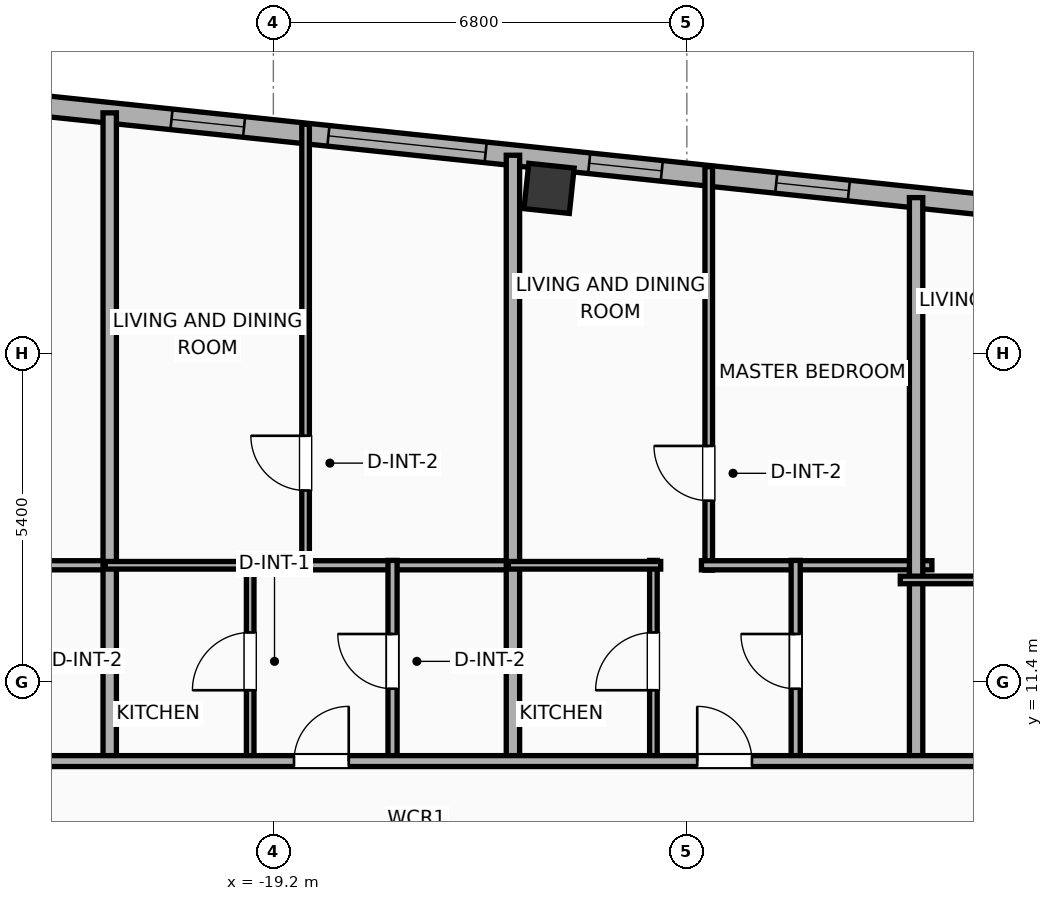
"""IFC4 building model, lengths in metres.
Left out: names, types, materials, properties, quantities, classifications, styles, units other than length and angle.
Written with IfcOpenShell. Run it as: python <this file> out.ifc"""

import sys

from ifc_helpers import new_model, si_unit, direction, frame, frame_2d, origin, origin_2d, place, context, subcontext, project, spatial, rectangle, hollow_rectangle, extrude, element, fill, save


model = new_model("IFC4")
c1 = context("Model", 3, precision=1e-05, world=origin(), true_north=direction((0.0, 1.0)))
c2 = subcontext(c1, "Body", "Model", "MODEL_VIEW")
j1 = project(units=[si_unit("LENGTHUNIT", "METRE"), si_unit("PLANEANGLEUNIT", "RADIAN")], contexts=[c1])
p1 = place(None, origin())
s1 = spatial("IfcSite", under=j1, at=p1, CompositionType="ELEMENT")
p2 = place(p1, origin())
s2 = spatial("IfcBuilding", under=s1, at=p2, CompositionType="ELEMENT")
p3 = place(p2, frame((0.0, 0.0, 299.0)))
s3 = spatial("IfcBuildingStorey", under=s2, at=p3, CompositionType="ELEMENT", Elevation=299.0)
p4 = place(p3, frame((-14.666, 19.518, 0.0), z_axis=(0.0, 0.0, 1.0), x_axis=(0.994521895368, -0.104528463268, 0.0)))
e1 = element("IfcColumn", 1, at=p4, inside=s3, PredefinedType="COLUMN", context=c2, shape_type="SweptSolid", body=[
    extrude(hollow_rectangle(XDim=0.75, YDim=0.75, WallThickness=0.025, at=origin_2d()), origin(), (0.0, 0.0, 1.0), 3.9),
])
p5 = place(p3, frame((-23.908, 20.972, 0.0), z_axis=(0.0, 0.0, 1.0), x_axis=(0.994521888554, -0.104528528102, 0.0)))
e2 = element("IfcWall", 2, at=p5, inside=s3, PredefinedType="ELEMENTEDWALL", context=c2, shape_type="SweptSolid", body=[
    extrude(rectangle(XDim=46.766, YDim=0.34, at=frame_2d((23.383, 0.0))), origin(), (0.0, 0.0, 1.0), 3.635),
])
p6 = place(p5, frame((5.644, 0.0, 0.65)))
e3 = element("IfcOpeningElement", 3, at=p6, cuts=e2, PredefinedType="OPENING", context=c2, shape_type="SweptSolid", body=[
    extrude(rectangle(XDim=2.6, YDim=2.45, at=frame_2d((1.3, 1.225))), frame((0.0, 0.18, 0.0), z_axis=(0.0, -1.0, 0.0), x_axis=(1.0, 0.0, 0.0)), (0.0, 0.0, 1.0), 0.36),
])
p7 = place(p5, frame((3.05, 0.0, 0.75)))
e4 = element("IfcOpeningElement", 4, at=p7, cuts=e2, PredefinedType="OPENING", context=c2, shape_type="SweptSolid", body=[
    extrude(rectangle(XDim=1.2, YDim=2.05, at=frame_2d((0.6, 1.025))), frame((0.0, 0.18, 0.0), z_axis=(0.0, -1.0, 0.0), x_axis=(1.0, 0.0, 0.0)), (0.0, 0.0, 1.0), 0.36),
])
p8 = place(p5, frame((9.957, 0.0, 0.75)))
e5 = element("IfcOpeningElement", 5, at=p8, cuts=e2, PredefinedType="OPENING", context=c2, shape_type="SweptSolid", body=[
    extrude(rectangle(XDim=1.2, YDim=2.05, at=frame_2d((0.6, 1.025))), frame((0.0, 0.18, 0.0), z_axis=(0.0, -1.0, 0.0), x_axis=(1.0, 0.0, 0.0)), (0.0, 0.0, 1.0), 0.36),
])
p9 = place(p5, frame((13.05, 0.0, 0.75)))
e6 = element("IfcOpeningElement", 6, at=p9, cuts=e2, PredefinedType="OPENING", context=c2, shape_type="SweptSolid", body=[
    extrude(rectangle(XDim=1.2, YDim=2.05, at=frame_2d((0.6, 1.025))), frame((0.0, 0.18, 0.0), z_axis=(0.0, -1.0, 0.0), x_axis=(1.0, 0.0, 0.0)), (0.0, 0.0, 1.0), 0.36),
])
p10 = place(p5, frame((16.383, 0.0, 0.75)))
e7 = element("IfcOpeningElement", 7, at=p10, cuts=e2, PredefinedType="OPENING", context=c2, shape_type="SweptSolid", body=[
    extrude(rectangle(XDim=1.2, YDim=2.05, at=frame_2d((0.6, 1.025))), frame((0.0, 0.18, 0.0), z_axis=(0.0, -1.0, 0.0), x_axis=(1.0, 0.0, 0.0)), (0.0, 0.0, 1.0), 0.36),
])
p11 = place(p5, frame((19.716, 0.0, 0.75)))
e8 = element("IfcOpeningElement", 8, at=p11, cuts=e2, PredefinedType="OPENING", context=c2, shape_type="SweptSolid", body=[
    extrude(rectangle(XDim=1.2, YDim=2.05, at=frame_2d((0.6, 1.025))), frame((0.0, 0.18, 0.0), z_axis=(0.0, -1.0, 0.0), x_axis=(1.0, 0.0, 0.0)), (0.0, 0.0, 1.0), 0.36),
])
p12 = place(p5, frame((23.195, 0.0, 0.75)))
e9 = element("IfcOpeningElement", 9, at=p12, cuts=e2, PredefinedType="OPENING", context=c2, shape_type="SweptSolid", body=[
    extrude(rectangle(XDim=1.2, YDim=2.05, at=frame_2d((0.6, 1.025))), frame((0.0, 0.18, 0.0), z_axis=(0.0, -1.0, 0.0), x_axis=(1.0, 0.0, 0.0)), (0.0, 0.0, 1.0), 0.36),
])
p13 = place(p5, frame((26.194, 0.0, 0.75)))
e10 = element("IfcOpeningElement", 10, at=p13, cuts=e2, PredefinedType="OPENING", context=c2, shape_type="SweptSolid", body=[
    extrude(rectangle(XDim=1.2, YDim=2.05, at=frame_2d((0.6, 1.025))), frame((0.0, 0.18, 0.0), z_axis=(0.0, -1.0, 0.0), x_axis=(1.0, 0.0, 0.0)), (0.0, 0.0, 1.0), 0.36),
])
p14 = place(p5, frame((30.152, 0.0, 0.75)))
e11 = element("IfcOpeningElement", 11, at=p14, cuts=e2, PredefinedType="OPENING", context=c2, shape_type="SweptSolid", body=[
    extrude(rectangle(XDim=1.2, YDim=2.05, at=frame_2d((0.6, 1.025))), frame((0.0, 0.18, 0.0), z_axis=(0.0, -1.0, 0.0), x_axis=(1.0, 0.0, 0.0)), (0.0, 0.0, 1.0), 0.36),
])
p15 = place(p5, frame((33.631, 0.0, 0.75)))
e12 = element("IfcOpeningElement", 12, at=p15, cuts=e2, PredefinedType="OPENING", context=c2, shape_type="SweptSolid", body=[
    extrude(rectangle(XDim=1.2, YDim=2.05, at=frame_2d((0.6, 1.025))), frame((0.0, 0.18, 0.0), z_axis=(0.0, -1.0, 0.0), x_axis=(1.0, 0.0, 0.0)), (0.0, 0.0, 1.0), 0.36),
])
p16 = place(p5, frame((38.07, 0.0, 0.75)))
e13 = element("IfcOpeningElement", 13, at=p16, cuts=e2, PredefinedType="OPENING", context=c2, shape_type="SweptSolid", body=[
    extrude(rectangle(XDim=1.2, YDim=2.05, at=frame_2d((0.6, 1.025))), frame((0.0, 0.18, 0.0), z_axis=(0.0, -1.0, 0.0), x_axis=(1.0, 0.0, 0.0)), (0.0, 0.0, 1.0), 0.36),
])
p17 = place(p5, frame((40.589, 0.0, 0.75)))
e14 = element("IfcOpeningElement", 14, at=p17, cuts=e2, PredefinedType="OPENING", context=c2, shape_type="SweptSolid", body=[
    extrude(rectangle(XDim=1.2, YDim=2.05, at=frame_2d((0.6, 1.025))), frame((0.0, 0.18, 0.0), z_axis=(0.0, -1.0, 0.0), x_axis=(1.0, 0.0, 0.0)), (0.0, 0.0, 1.0), 0.36),
])
p18 = place(p5, frame((43.789, 0.0, 0.75)))
e15 = element("IfcOpeningElement", 15, at=p18, cuts=e2, PredefinedType="OPENING", context=c2, shape_type="SweptSolid", body=[
    extrude(rectangle(XDim=1.2, YDim=2.05, at=frame_2d((0.6, 1.025))), frame((0.0, 0.18, 0.0), z_axis=(0.0, -1.0, 0.0), x_axis=(1.0, 0.0, 0.0)), (0.0, 0.0, 1.0), 0.36),
])
p19 = place(p3, frame((-25.421, 13.32, 0.0), z_axis=(0.0, 0.0, 1.0), x_axis=(1.0, 0.0, 0.0)))
e16 = element("IfcWall", 16, at=p19, inside=s3, PredefinedType="PLUMBINGWALL", context=c2, shape_type="SweptSolid", body=[
    extrude(rectangle(XDim=3.605, YDim=0.15, at=frame_2d((1.802, 0.0))), origin(), (0.0, 0.0, 1.0), 3.635),
])
p20 = place(p3, frame((-21.891, 10.02, 0.0), z_axis=(0.0, 0.0, 1.0), x_axis=(0.0, 1.0, 0.0)))
e17 = element("IfcWall", 17, at=p20, inside=s3, PredefinedType="PARTITIONING", context=c2, shape_type="SweptSolid", body=[
    extrude(rectangle(XDim=10.74, YDim=0.22, at=frame_2d((5.37, 0.0))), origin(), (0.0, 0.0, 1.0), 3.075),
])
p21 = place(p3, frame((-18.67, 13.24, 0.0), z_axis=(0.0, 0.0, 1.0), x_axis=(0.0, 1.0, 0.0)))
e18 = element("IfcWall", 18, at=p21, inside=s3, PredefinedType="PARTITIONING", context=c2, shape_type="SweptSolid", body=[
    extrude(rectangle(XDim=7.333, YDim=0.125, at=frame_2d((3.666, 0.0))), origin(), (0.0, 0.0, 1.0), 3.635),
])
p22 = place(p21, frame((1.31, 0.0, 0.0)))
e19 = element("IfcOpeningElement", 19, at=p22, cuts=e18, PredefinedType="OPENING", context=c2, shape_type="SweptSolid", body=[
    extrude(rectangle(XDim=0.9, YDim=2.05, at=frame_2d((0.45, 1.025))), frame((0.0, 0.073, 0.0), z_axis=(0.0, -1.0, 0.0), x_axis=(1.0, 0.0, 0.0)), (0.0, 0.0, 1.0), 0.145),
])
p23 = place(p3, frame((-18.79, 13.32, 0.0), z_axis=(0.0, 0.0, 1.0), x_axis=(1.0, 0.0, 0.0)))
e20 = element("IfcWall", 20, at=p23, inside=s3, PredefinedType="PLUMBINGWALL", context=c2, shape_type="SweptSolid", body=[
    extrude(rectangle(XDim=3.605, YDim=0.15, at=frame_2d((1.802, 0.0))), origin(), (0.0, 0.0, 1.0), 3.635),
])
p24 = place(p3, frame((-19.581, 10.08, 0.0), z_axis=(0.0, 0.0, 1.0), x_axis=(0.0, 1.0, 0.0)))
e21 = element("IfcWall", 21, at=p24, inside=s3, PredefinedType="PARTITIONING", context=c2, shape_type="SweptSolid", body=[
    extrude(rectangle(XDim=3.32, YDim=0.125, at=frame_2d((1.66, 0.0))), origin(), (0.0, 0.0, 1.0), 3.635),
])
p25 = place(p24, frame((1.185, 0.0, 0.0)))
e22 = element("IfcOpeningElement", 22, at=p25, cuts=e21, PredefinedType="OPENING", context=c2, shape_type="SweptSolid", body=[
    extrude(rectangle(XDim=0.95, YDim=2.05, at=frame_2d((0.475, 1.025))), frame((0.0, 0.073, 0.0), z_axis=(0.0, -1.0, 0.0), x_axis=(1.0, 0.0, 0.0)), (0.0, 0.0, 1.0), 0.145),
])
p26 = place(p3, frame((-21.966, 13.32, 0.0), z_axis=(0.0, 0.0, 1.0), x_axis=(1.0, 0.0, 0.0)))
e23 = element("IfcWall", 23, at=p26, inside=s3, PredefinedType="PARTITIONING", context=c2, shape_type="SweptSolid", body=[
    extrude(rectangle(XDim=2.505, YDim=0.125, at=frame_2d((1.252, 0.0))), origin(), (0.0, 0.0, 1.0), 3.635),
])
p27 = place(p3, frame((-17.24, 10.08, 0.0), z_axis=(0.0, 0.0, 1.0), x_axis=(0.0, 1.0, 0.0)))
e24 = element("IfcWall", 24, at=p27, inside=s3, PredefinedType="PLUMBINGWALL", context=c2, shape_type="SweptSolid", body=[
    extrude(rectangle(XDim=3.32, YDim=0.15, at=frame_2d((1.66, 0.0))), origin(), (0.0, 0.0, 1.0), 3.635),
])
p28 = place(p27, frame((1.21, 0.0, 0.0)))
e25 = element("IfcOpeningElement", 25, at=p28, cuts=e24, PredefinedType="OPENING", context=c2, shape_type="SweptSolid", body=[
    extrude(rectangle(XDim=0.9, YDim=2.05, at=frame_2d((0.45, 1.025))), frame((0.0, 0.085, 0.0), z_axis=(0.0, -1.0, 0.0), x_axis=(1.0, 0.0, 0.0)), (0.0, 0.0, 1.0), 0.17),
])
p29 = place(p3, frame((-15.26, 10.02, 0.0), z_axis=(0.0, 0.0, 1.0), x_axis=(0.0, 1.0, 0.0)))
e26 = element("IfcWall", 26, at=p29, inside=s3, PredefinedType="PARTITIONING", context=c2, shape_type="SweptSolid", body=[
    extrude(rectangle(XDim=10.043, YDim=0.22, at=frame_2d((5.021, 0.0))), origin(), (0.0, 0.0, 1.0), 3.075),
])
p30 = place(p3, frame((-12.04, 13.24, 0.0), z_axis=(0.0, 0.0, 1.0), x_axis=(0.0, 1.0, 0.0)))
e27 = element("IfcWall", 27, at=p30, inside=s3, PredefinedType="PARTITIONING", context=c2, shape_type="SweptSolid", body=[
    extrude(rectangle(XDim=6.635, YDim=0.125, at=frame_2d((3.318, 0.0))), origin(), (0.0, 0.0, 1.0), 3.635),
])
p31 = place(p30, frame((1.143, 0.0, 0.0)))
e28 = element("IfcOpeningElement", 28, at=p31, cuts=e27, PredefinedType="OPENING", context=c2, shape_type="SweptSolid", body=[
    extrude(rectangle(XDim=0.9, YDim=2.05, at=frame_2d((0.45, 1.025))), frame((0.0, 0.073, 0.0), z_axis=(0.0, -1.0, 0.0), x_axis=(1.0, 0.0, 0.0)), (0.0, 0.0, 1.0), 0.145),
])
p32 = place(p3, frame((-12.16, 13.32, 0.0), z_axis=(0.0, 0.0, 1.0), x_axis=(1.0, 0.0, 0.0)))
e29 = element("IfcWall", 29, at=p32, inside=s3, PredefinedType="PLUMBINGWALL", context=c2, shape_type="SweptSolid", body=[
    extrude(rectangle(XDim=3.79, YDim=0.15, at=frame_2d((1.895, 0.0))), origin(), (0.0, 0.0, 1.0), 3.635),
])
p33 = place(p3, frame((-12.95, 10.08, 0.0), z_axis=(0.0, 0.0, 1.0), x_axis=(0.0, 1.0, 0.0)))
e30 = element("IfcWall", 30, at=p33, inside=s3, PredefinedType="PARTITIONING", context=c2, shape_type="SweptSolid", body=[
    extrude(rectangle(XDim=3.32, YDim=0.125, at=frame_2d((1.66, 0.0))), origin(), (0.0, 0.0, 1.0), 3.635),
])
p34 = place(p33, frame((1.185, 0.0, 0.0)))
e31 = element("IfcOpeningElement", 31, at=p34, cuts=e30, PredefinedType="OPENING", context=c2, shape_type="SweptSolid", body=[
    extrude(rectangle(XDim=0.95, YDim=2.05, at=frame_2d((0.475, 1.025))), frame((0.0, 0.073, 0.0), z_axis=(0.0, -1.0, 0.0), x_axis=(1.0, 0.0, 0.0)), (0.0, 0.0, 1.0), 0.145),
])
p35 = place(p3, frame((-15.335, 13.32, 0.0), z_axis=(0.0, 0.0, 1.0), x_axis=(1.0, 0.0, 0.0)))
e32 = element("IfcWall", 32, at=p35, inside=s3, PredefinedType="PARTITIONING", context=c2, shape_type="SweptSolid", body=[
    extrude(rectangle(XDim=2.505, YDim=0.125, at=frame_2d((1.252, 0.0))), origin(), (0.0, 0.0, 1.0), 3.635),
])
p36 = place(p3, frame((-10.61, 10.08, 0.0), z_axis=(0.0, 0.0, 1.0), x_axis=(0.0, 1.0, 0.0)))
e33 = element("IfcWall", 33, at=p36, inside=s3, PredefinedType="PLUMBINGWALL", context=c2, shape_type="SweptSolid", body=[
    extrude(rectangle(XDim=3.32, YDim=0.15, at=frame_2d((1.66, 0.0))), origin(), (0.0, 0.0, 1.0), 3.635),
])
p37 = place(p36, frame((1.21, 0.0, 0.0)))
e34 = element("IfcOpeningElement", 34, at=p37, cuts=e33, PredefinedType="OPENING", context=c2, shape_type="SweptSolid", body=[
    extrude(rectangle(XDim=0.9, YDim=2.05, at=frame_2d((0.45, 1.025))), frame((0.0, 0.085, 0.0), z_axis=(0.0, -1.0, 0.0), x_axis=(1.0, 0.0, 0.0)), (0.0, 0.0, 1.0), 0.17),
])
p38 = place(p3, frame((-8.63, 10.02, 0.0), z_axis=(0.0, 0.0, 1.0), x_axis=(0.0, 1.0, 0.0)))
e35 = element("IfcWall", 35, at=p38, inside=s3, PredefinedType="PARTITIONING", context=c2, shape_type="SweptSolid", body=[
    extrude(rectangle(XDim=9.346, YDim=0.22, at=frame_2d((4.673, 0.0))), origin(), (0.0, 0.0, 1.0), 3.635),
])
p39 = place(p3, frame((-8.89, 13.079, 0.0), z_axis=(0.0, 0.0, 1.0), x_axis=(1.0, 0.0, 0.0)))
e36 = element("IfcWall", 36, at=p39, inside=s3, PredefinedType="PARTITIONING", context=c2, shape_type="SweptSolid", body=[
    extrude(rectangle(XDim=2.69, YDim=0.125, at=frame_2d((1.345, 0.0))), origin(), (0.0, 0.0, 1.0), 3.635),
])
p40 = place(p3, frame((-28.516, 10.1, 0.0), z_axis=(0.0, 0.0, 1.0), x_axis=(1.0, 0.0, 0.0)))
e37 = element("IfcWall", 37, at=p40, inside=s3, PredefinedType="PARTITIONING", context=c2, shape_type="SweptSolid", body=[
    extrude(rectangle(XDim=53.955, YDim=0.18, at=frame_2d((26.978, 0.0))), origin(), (0.0, 0.0, 1.0), 3.635),
])
p41 = place(p40, frame((2.998, 0.0, 0.0)))
e38 = element("IfcOpeningElement", 38, at=p41, cuts=e37, PredefinedType="OPENING", context=c2, shape_type="SweptSolid", body=[
    extrude(rectangle(XDim=0.9, YDim=2.05, at=frame_2d((0.45, 1.025))), frame((0.0, 0.1, 0.0), z_axis=(0.0, -1.0, 0.0), x_axis=(1.0, 0.0, 0.0)), (0.0, 0.0, 1.0), 0.2),
])
p42 = place(p40, frame((9.656, 0.0, 0.0)))
e39 = element("IfcOpeningElement", 39, at=p42, cuts=e37, PredefinedType="OPENING", context=c2, shape_type="SweptSolid", body=[
    extrude(rectangle(XDim=0.9, YDim=2.05, at=frame_2d((0.45, 1.025))), frame((0.0, 0.1, 0.0), z_axis=(0.0, -1.0, 0.0), x_axis=(1.0, 0.0, 0.0)), (0.0, 0.0, 1.0), 0.2),
])
p43 = place(p40, frame((16.287, 0.0, 0.0)))
e40 = element("IfcOpeningElement", 40, at=p43, cuts=e37, PredefinedType="OPENING", context=c2, shape_type="SweptSolid", body=[
    extrude(rectangle(XDim=0.9, YDim=2.05, at=frame_2d((0.45, 1.025))), frame((0.0, 0.1, 0.0), z_axis=(0.0, -1.0, 0.0), x_axis=(1.0, 0.0, 0.0)), (0.0, 0.0, 1.0), 0.2),
])
p44 = place(p40, frame((22.918, 0.0, 0.0)))
e41 = element("IfcOpeningElement", 41, at=p44, cuts=e37, PredefinedType="OPENING", context=c2, shape_type="SweptSolid", body=[
    extrude(rectangle(XDim=0.9, YDim=2.05, at=frame_2d((0.45, 1.025))), frame((0.0, 0.1, 0.0), z_axis=(0.0, -1.0, 0.0), x_axis=(1.0, 0.0, 0.0)), (0.0, 0.0, 1.0), 0.2),
])
p45 = place(p40, frame((29.689, 0.0, 0.0)))
e42 = element("IfcOpeningElement", 42, at=p45, cuts=e37, PredefinedType="OPENING", context=c2, shape_type="SweptSolid", body=[
    extrude(rectangle(XDim=0.9, YDim=2.05, at=frame_2d((0.45, 1.025))), frame((0.0, 0.1, 0.0), z_axis=(0.0, -1.0, 0.0), x_axis=(1.0, 0.0, 0.0)), (0.0, 0.0, 1.0), 0.2),
])
p46 = place(p40, frame((36.612, 0.0, 0.0)))
e43 = element("IfcOpeningElement", 43, at=p46, cuts=e37, PredefinedType="OPENING", context=c2, shape_type="SweptSolid", body=[
    extrude(rectangle(XDim=0.9, YDim=2.05, at=frame_2d((0.45, 1.025))), frame((0.0, 0.1, 0.0), z_axis=(0.0, -1.0, 0.0), x_axis=(1.0, 0.0, 0.0)), (0.0, 0.0, 1.0), 0.2),
])
p47 = place(p40, frame((43.529, 0.0, 0.0)))
e44 = element("IfcOpeningElement", 44, at=p47, cuts=e37, PredefinedType="OPENING", context=c2, shape_type="SweptSolid", body=[
    extrude(rectangle(XDim=0.9, YDim=2.05, at=frame_2d((0.45, 1.025))), frame((0.0, 0.1, 0.0), z_axis=(0.0, -1.0, 0.0), x_axis=(1.0, 0.0, 0.0)), (0.0, 0.0, 1.0), 0.2),
])
p48 = place(p40, frame((50.452, 0.0, 0.0)))
e45 = element("IfcOpeningElement", 45, at=p48, cuts=e37, PredefinedType="OPENING", context=c2, shape_type="SweptSolid", body=[
    extrude(rectangle(XDim=0.9, YDim=2.05, at=frame_2d((0.45, 1.025))), frame((0.0, 0.1, 0.0), z_axis=(0.0, -1.0, 0.0), x_axis=(1.0, 0.0, 0.0)), (0.0, 0.0, 1.0), 0.2),
])
p49 = place(p6, origin())
e46 = element("IfcWindow", 46, at=p49, inside=s3, PartitioningType="SINGLE_PANEL", PredefinedType="WINDOW", context=c2, shape_type="SweptSolid", body=[
    extrude(rectangle(XDim=2.6, YDim=2.45, at=frame_2d((1.3, 1.225))), frame((0.0, 0.03, 0.0), z_axis=(0.0, -1.0, 0.0), x_axis=(1.0, 0.0, 0.0)), (0.0, 0.0, 1.0), 0.06),
])
fill(e3, e46)
p50 = place(p7, origin())
e47 = element("IfcWindow", 47, at=p50, inside=s3, PartitioningType="SINGLE_PANEL", PredefinedType="WINDOW", context=c2, shape_type="SweptSolid", body=[
    extrude(rectangle(XDim=1.2, YDim=2.05, at=frame_2d((0.6, 1.025))), frame((0.0, 0.03, 0.0), z_axis=(0.0, -1.0, 0.0), x_axis=(1.0, 0.0, 0.0)), (0.0, 0.0, 1.0), 0.06),
])
fill(e4, e47)
p51 = place(p8, origin())
e48 = element("IfcWindow", 48, at=p51, inside=s3, PartitioningType="SINGLE_PANEL", PredefinedType="WINDOW", context=c2, shape_type="SweptSolid", body=[
    extrude(rectangle(XDim=1.2, YDim=2.05, at=frame_2d((0.6, 1.025))), frame((0.0, 0.03, 0.0), z_axis=(0.0, -1.0, 0.0), x_axis=(1.0, 0.0, 0.0)), (0.0, 0.0, 1.0), 0.06),
])
fill(e5, e48)
p52 = place(p9, origin())
e49 = element("IfcWindow", 49, at=p52, inside=s3, PartitioningType="SINGLE_PANEL", PredefinedType="WINDOW", context=c2, shape_type="SweptSolid", body=[
    extrude(rectangle(XDim=1.2, YDim=2.05, at=frame_2d((0.6, 1.025))), frame((0.0, 0.03, 0.0), z_axis=(0.0, -1.0, 0.0), x_axis=(1.0, 0.0, 0.0)), (0.0, 0.0, 1.0), 0.06),
])
fill(e6, e49)
p53 = place(p22, origin())
e50 = element("IfcDoor", 50, at=p53, inside=s3, OperationType="SINGLE_SWING_RIGHT", PredefinedType="DOOR", context=c2, shape_type="SweptSolid", body=[
    extrude(rectangle(XDim=0.9, YDim=2.05, at=frame_2d((0.45, 1.025))), frame((0.0, 0.025, 0.0), z_axis=(0.0, -1.0, 0.0), x_axis=(1.0, 0.0, 0.0)), (0.0, 0.0, 1.0), 0.05),
])
fill(e19, e50)
p54 = place(p25, origin())
e51 = element("IfcDoor", 51, at=p54, inside=s3, OperationType="SINGLE_SWING_LEFT", PredefinedType="DOOR", context=c2, shape_type="SweptSolid", body=[
    extrude(rectangle(XDim=0.95, YDim=2.05, at=frame_2d((0.475, 1.025))), frame((0.0, 0.025, 0.0), z_axis=(0.0, -1.0, 0.0), x_axis=(1.0, 0.0, 0.0)), (0.0, 0.0, 1.0), 0.05),
])
fill(e22, e51)
p55 = place(p28, origin())
e52 = element("IfcDoor", 52, at=p55, inside=s3, OperationType="SINGLE_SWING_RIGHT", PredefinedType="DOOR", context=c2, shape_type="SweptSolid", body=[
    extrude(rectangle(XDim=0.9, YDim=2.05, at=frame_2d((0.45, 1.025))), frame((0.0, 0.025, 0.0), z_axis=(0.0, -1.0, 0.0), x_axis=(1.0, 0.0, 0.0)), (0.0, 0.0, 1.0), 0.05),
])
fill(e25, e52)
p56 = place(p31, origin())
e53 = element("IfcDoor", 53, at=p56, inside=s3, OperationType="SINGLE_SWING_RIGHT", PredefinedType="DOOR", context=c2, shape_type="SweptSolid", body=[
    extrude(rectangle(XDim=0.9, YDim=2.05, at=frame_2d((0.45, 1.025))), frame((0.0, 0.025, 0.0), z_axis=(0.0, -1.0, 0.0), x_axis=(1.0, 0.0, 0.0)), (0.0, 0.0, 1.0), 0.05),
])
fill(e28, e53)
p57 = place(p34, origin())
e54 = element("IfcDoor", 54, at=p57, inside=s3, OperationType="SINGLE_SWING_LEFT", PredefinedType="DOOR", context=c2, shape_type="SweptSolid", body=[
    extrude(rectangle(XDim=0.95, YDim=2.05, at=frame_2d((0.475, 1.025))), frame((0.0, 0.025, 0.0), z_axis=(0.0, -1.0, 0.0), x_axis=(1.0, 0.0, 0.0)), (0.0, 0.0, 1.0), 0.05),
])
fill(e31, e54)
p58 = place(p37, origin())
e55 = element("IfcDoor", 55, at=p58, inside=s3, OperationType="SINGLE_SWING_RIGHT", PredefinedType="DOOR", context=c2, shape_type="SweptSolid", body=[
    extrude(rectangle(XDim=0.9, YDim=2.05, at=frame_2d((0.45, 1.025))), frame((0.0, 0.025, 0.0), z_axis=(0.0, -1.0, 0.0), x_axis=(1.0, 0.0, 0.0)), (0.0, 0.0, 1.0), 0.05),
])
fill(e34, e55)
p59 = place(p42, origin())
e56 = element("IfcDoor", 56, at=p59, inside=s3, OperationType="SINGLE_SWING_RIGHT", PredefinedType="DOOR", context=c2, shape_type="SweptSolid", body=[
    extrude(rectangle(XDim=0.9, YDim=2.05, at=frame_2d((0.45, 1.025))), frame((0.0, 0.025, 0.0), z_axis=(0.0, -1.0, 0.0), x_axis=(1.0, 0.0, 0.0)), (0.0, 0.0, 1.0), 0.05),
])
fill(e39, e56)
p60 = place(p43, origin())
e57 = element("IfcDoor", 57, at=p60, inside=s3, OperationType="SINGLE_SWING_LEFT", PredefinedType="DOOR", context=c2, shape_type="SweptSolid", body=[
    extrude(rectangle(XDim=0.9, YDim=2.05, at=frame_2d((0.45, 1.025))), frame((0.0, 0.025, 0.0), z_axis=(0.0, -1.0, 0.0), x_axis=(1.0, 0.0, 0.0)), (0.0, 0.0, 1.0), 0.05),
])
fill(e40, e57)
save(model, sys.argv[1])
